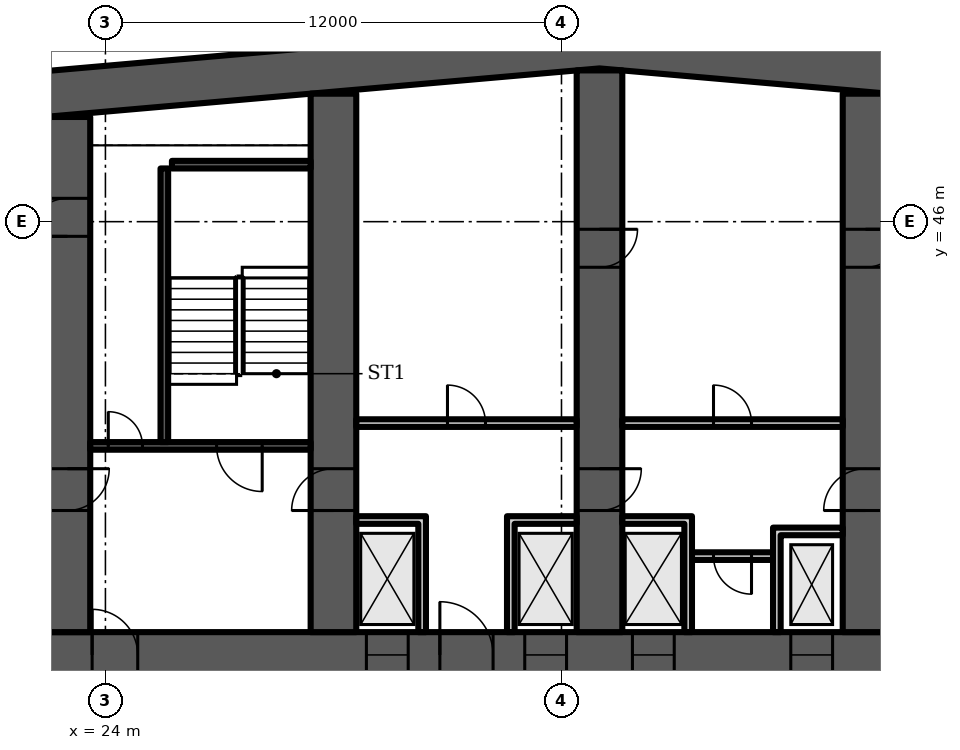
"""IFC4 building model, lengths in metres.
Left out: names, types, materials, properties, quantities, classifications, styles, units other than length and angle.
Written with IfcOpenShell. Run it as: python <this file> out.ifc"""

import sys

from ifc_helpers import new_model, si_unit, direction, frame, frame_2d, origin, place, context, subcontext, project, spatial, polyline, rectangle, outline, extrude, element, fill, save


model = new_model("IFC4")
c1 = context("Model", 3, precision=1e-05, world=origin(), true_north=direction((0.0, 1.0)))
c2 = subcontext(c1, "Body", "Model", "MODEL_VIEW")
j1 = project(units=[si_unit("LENGTHUNIT", "METRE"), si_unit("PLANEANGLEUNIT", "RADIAN")], contexts=[c1])
p1 = place(None, origin())
s1 = spatial("IfcSite", under=j1, at=p1, CompositionType="ELEMENT")
p2 = place(p1, origin())
s2 = spatial("IfcBuilding", under=s1, at=p2, CompositionType="ELEMENT")
p3 = place(p2, frame((0.0, 0.0, 77.5)))
s3 = spatial("IfcBuildingStorey", under=s2, at=p3, CompositionType="ELEMENT", Elevation=77.5)
p4 = place(p3, origin())
e1 = element("IfcWall", 1, at=p4, inside=s3, PredefinedType="SHEAR", context=c2, shape_type="SweptSolid", body=[
    extrude(outline(polyline([(9.0, 47.583), (37.0, 50.032), (65.0, 47.583), (65.0, 48.787), (37.0, 51.237), (9.0, 48.787), (9.0, 47.583)])), origin(), (0.0, 0.0, 1.0), 3.6),
])
p5 = place(p3, frame((9.0, 34.6, 0.0), z_axis=(0.0, 0.0, 1.0), x_axis=(1.0, 0.0, 0.0)))
e2 = element("IfcWall", 2, at=p5, inside=s3, PredefinedType="SHEAR", context=c2, shape_type="SweptSolid", body=[
    extrude(rectangle(XDim=56.0, YDim=1.2, at=frame_2d((28.0, 0.0))), origin(), (0.0, 0.0, 1.0), 3.6),
])
p6 = place(p5, frame((3.3, 0.0, 0.0)))
e3 = element("IfcOpeningElement", 3, at=p6, cuts=e2, PredefinedType="OPENING", context=c2, shape_type="SweptSolid", body=[
    extrude(rectangle(XDim=1.0, YDim=2.1, at=frame_2d((0.5, 1.05))), frame((0.0, 0.61, 0.0), z_axis=(0.0, -1.0, 0.0), x_axis=(1.0, 0.0, 0.0)), (0.0, 0.0, 1.0), 1.22),
])
p7 = place(p5, frame((7.867, 0.0, 0.0)))
e4 = element("IfcOpeningElement", 4, at=p7, cuts=e2, PredefinedType="OPENING", context=c2, shape_type="SweptSolid", body=[
    extrude(rectangle(XDim=1.1, YDim=2.1, at=frame_2d((0.55, 1.05))), frame((0.0, 0.61, 0.0), z_axis=(0.0, -1.0, 0.0), x_axis=(1.0, 0.0, 0.0)), (0.0, 0.0, 1.0), 1.22),
])
p8 = place(p5, frame((12.033, 0.0, 0.0)))
e5 = element("IfcOpeningElement", 5, at=p8, cuts=e2, PredefinedType="OPENING", context=c2, shape_type="SweptSolid", body=[
    extrude(rectangle(XDim=1.1, YDim=2.1, at=frame_2d((0.55, 1.05))), frame((0.0, 0.61, 0.0), z_axis=(0.0, -1.0, 0.0), x_axis=(1.0, 0.0, 0.0)), (0.0, 0.0, 1.0), 1.22),
])
p9 = place(p5, frame((9.8, 0.0, 0.0)))
e6 = element("IfcOpeningElement", 6, at=p9, cuts=e2, PredefinedType="OPENING", context=c2, shape_type="SweptSolid", body=[
    extrude(rectangle(XDim=1.4, YDim=2.1, at=frame_2d((0.7, 1.05))), frame((0.0, 0.61, 0.0), z_axis=(0.0, -1.0, 0.0), x_axis=(1.0, 0.0, 0.0)), (0.0, 0.0, 1.0), 1.22),
])
p10 = place(p5, frame((14.65, 0.0, 0.0)))
e7 = element("IfcOpeningElement", 7, at=p10, cuts=e2, PredefinedType="OPENING", context=c2, shape_type="SweptSolid", body=[
    extrude(rectangle(XDim=1.2, YDim=2.1, at=frame_2d((0.6, 1.05))), frame((0.0, 0.61, 0.0), z_axis=(0.0, -1.0, 0.0), x_axis=(1.0, 0.0, 0.0)), (0.0, 0.0, 1.0), 1.22),
])
p11 = place(p5, frame((21.867, 0.0, 0.0)))
e8 = element("IfcOpeningElement", 8, at=p11, cuts=e2, PredefinedType="OPENING", context=c2, shape_type="SweptSolid", body=[
    extrude(rectangle(XDim=1.1, YDim=2.1, at=frame_2d((0.55, 1.05))), frame((0.0, 0.61, 0.0), z_axis=(0.0, -1.0, 0.0), x_axis=(1.0, 0.0, 0.0)), (0.0, 0.0, 1.0), 1.22),
])
p12 = place(p5, frame((26.033, 0.0, 0.0)))
e9 = element("IfcOpeningElement", 9, at=p12, cuts=e2, PredefinedType="OPENING", context=c2, shape_type="SweptSolid", body=[
    extrude(rectangle(XDim=1.1, YDim=2.1, at=frame_2d((0.55, 1.05))), frame((0.0, 0.61, 0.0), z_axis=(0.0, -1.0, 0.0), x_axis=(1.0, 0.0, 0.0)), (0.0, 0.0, 1.0), 1.22),
])
p13 = place(p5, frame((23.8, 0.0, 0.0)))
e10 = element("IfcOpeningElement", 10, at=p13, cuts=e2, PredefinedType="OPENING", context=c2, shape_type="SweptSolid", body=[
    extrude(rectangle(XDim=1.4, YDim=2.1, at=frame_2d((0.7, 1.05))), frame((0.0, 0.61, 0.0), z_axis=(0.0, -1.0, 0.0), x_axis=(1.0, 0.0, 0.0)), (0.0, 0.0, 1.0), 1.22),
])
p14 = place(p5, frame((28.867, 0.0, 0.0)))
e11 = element("IfcOpeningElement", 11, at=p14, cuts=e2, PredefinedType="OPENING", context=c2, shape_type="SweptSolid", body=[
    extrude(rectangle(XDim=1.1, YDim=2.1, at=frame_2d((0.55, 1.05))), frame((0.0, 0.61, 0.0), z_axis=(0.0, -1.0, 0.0), x_axis=(1.0, 0.0, 0.0)), (0.0, 0.0, 1.0), 1.22),
])
p15 = place(p5, frame((33.033, 0.0, 0.0)))
e12 = element("IfcOpeningElement", 12, at=p15, cuts=e2, PredefinedType="OPENING", context=c2, shape_type="SweptSolid", body=[
    extrude(rectangle(XDim=1.1, YDim=2.1, at=frame_2d((0.55, 1.05))), frame((0.0, 0.61, 0.0), z_axis=(0.0, -1.0, 0.0), x_axis=(1.0, 0.0, 0.0)), (0.0, 0.0, 1.0), 1.22),
])
p16 = place(p5, frame((40.15, 0.0, 0.0)))
e13 = element("IfcOpeningElement", 13, at=p16, cuts=e2, PredefinedType="OPENING", context=c2, shape_type="SweptSolid", body=[
    extrude(rectangle(XDim=1.2, YDim=2.1, at=frame_2d((0.6, 1.05))), frame((0.0, 0.61, 0.0), z_axis=(0.0, -1.0, 0.0), x_axis=(1.0, 0.0, 0.0)), (0.0, 0.0, 1.0), 1.22),
])
p17 = place(p5, frame((44.8, 0.0, 0.0)))
e14 = element("IfcOpeningElement", 14, at=p17, cuts=e2, PredefinedType="OPENING", context=c2, shape_type="SweptSolid", body=[
    extrude(rectangle(XDim=1.4, YDim=2.1, at=frame_2d((0.7, 1.05))), frame((0.0, 0.61, 0.0), z_axis=(0.0, -1.0, 0.0), x_axis=(1.0, 0.0, 0.0)), (0.0, 0.0, 1.0), 1.22),
])
p18 = place(p5, frame((49.867, 0.0, 0.0)))
e15 = element("IfcOpeningElement", 15, at=p18, cuts=e2, PredefinedType="OPENING", context=c2, shape_type="SweptSolid", body=[
    extrude(rectangle(XDim=1.1, YDim=2.1, at=frame_2d((0.55, 1.05))), frame((0.0, 0.61, 0.0), z_axis=(0.0, -1.0, 0.0), x_axis=(1.0, 0.0, 0.0)), (0.0, 0.0, 1.0), 1.22),
])
p19 = place(p5, frame((53.5, 0.0, 0.0)))
e16 = element("IfcOpeningElement", 16, at=p19, cuts=e2, PredefinedType="OPENING", context=c2, shape_type="SweptSolid", body=[
    extrude(rectangle(XDim=1.1, YDim=2.1, at=frame_2d((0.55, 1.05))), frame((0.0, 0.61, 0.0), z_axis=(0.0, -1.0, 0.0), x_axis=(1.0, 0.0, 0.0)), (0.0, 0.0, 1.0), 1.22),
])
p20 = place(p5, frame((51.567, 0.0, 0.0)))
e17 = element("IfcOpeningElement", 17, at=p20, cuts=e2, PredefinedType="OPENING", context=c2, shape_type="SweptSolid", body=[
    extrude(rectangle(XDim=1.4, YDim=2.1, at=frame_2d((0.7, 1.05))), frame((0.0, 0.61, 0.0), z_axis=(0.0, -1.0, 0.0), x_axis=(1.0, 0.0, 0.0)), (0.0, 0.0, 1.0), 1.22),
])
p21 = place(p3, frame((23.0, 35.2, 0.0), z_axis=(0.0, 0.0, 1.0), x_axis=(0.0, 1.0, 0.0)))
e18 = element("IfcWall", 18, at=p21, inside=s3, PredefinedType="SHEAR", context=c2, shape_type="SweptSolid", body=[
    extrude(rectangle(XDim=13.555, YDim=1.2, at=frame_2d((6.778, 0.0))), origin(), (0.0, 0.0, 1.0), 3.6),
])
p22 = place(p21, frame((10.414, 0.0, 0.0)))
e19 = element("IfcOpeningElement", 19, at=p22, cuts=e18, PredefinedType="OPENING", context=c2, shape_type="SweptSolid", body=[
    extrude(rectangle(XDim=1.0, YDim=2.1, at=frame_2d((0.5, 1.05))), frame((0.0, 0.61, 0.0), z_axis=(0.0, -1.0, 0.0), x_axis=(1.0, 0.0, 0.0)), (0.0, 0.0, 1.0), 1.22),
])
p23 = place(p21, frame((3.2, 0.0, 0.0)))
e20 = element("IfcOpeningElement", 20, at=p23, cuts=e18, PredefinedType="OPENING", context=c2, shape_type="SweptSolid", body=[
    extrude(rectangle(XDim=1.1, YDim=2.1, at=frame_2d((0.55, 1.05))), frame((0.0, 0.61, 0.0), z_axis=(0.0, -1.0, 0.0), x_axis=(1.0, 0.0, 0.0)), (0.0, 0.0, 1.0), 1.22),
])
p24 = place(p3, frame((30.0, 35.2, 0.0), z_axis=(0.0, 0.0, 1.0), x_axis=(0.0, 1.0, 0.0)))
e21 = element("IfcWall", 21, at=p24, inside=s3, PredefinedType="SHEAR", context=c2, shape_type="SweptSolid", body=[
    extrude(rectangle(XDim=14.168, YDim=1.2, at=frame_2d((7.084, 0.0))), origin(), (0.0, 0.0, 1.0), 3.6),
])
p25 = place(p24, frame((3.2, 0.0, 0.0)))
e22 = element("IfcOpeningElement", 22, at=p25, cuts=e21, PredefinedType="OPENING", context=c2, shape_type="SweptSolid", body=[
    extrude(rectangle(XDim=1.1, YDim=2.1, at=frame_2d((0.55, 1.05))), frame((0.0, 0.61, 0.0), z_axis=(0.0, -1.0, 0.0), x_axis=(1.0, 0.0, 0.0)), (0.0, 0.0, 1.0), 1.22),
])
p26 = place(p3, frame((37.0, 35.2, 0.0), z_axis=(0.0, 0.0, 1.0), x_axis=(0.0, 1.0, 0.0)))
e23 = element("IfcWall", 23, at=p26, inside=s3, PredefinedType="SHEAR", context=c2, shape_type="SweptSolid", body=[
    extrude(rectangle(XDim=14.78, YDim=1.2, at=frame_2d((7.39, 0.0))), origin(), (0.0, 0.0, 1.0), 3.6),
])
p27 = place(p26, frame((3.2, 0.0, 0.0)))
e24 = element("IfcOpeningElement", 24, at=p27, cuts=e23, PredefinedType="OPENING", context=c2, shape_type="SweptSolid", body=[
    extrude(rectangle(XDim=1.1, YDim=2.1, at=frame_2d((0.55, 1.05))), frame((0.0, 0.61, 0.0), z_axis=(0.0, -1.0, 0.0), x_axis=(1.0, 0.0, 0.0)), (0.0, 0.0, 1.0), 1.22),
])
p28 = place(p26, frame((9.6, 0.0, 0.0)))
e25 = element("IfcOpeningElement", 25, at=p28, cuts=e23, PredefinedType="OPENING", context=c2, shape_type="SweptSolid", body=[
    extrude(rectangle(XDim=1.0, YDim=2.1, at=frame_2d((0.5, 1.05))), frame((0.0, 0.61, 0.0), z_axis=(0.0, -1.0, 0.0), x_axis=(1.0, 0.0, 0.0)), (0.0, 0.0, 1.0), 1.22),
])
p29 = place(p3, frame((44.0, 35.2, 0.0), z_axis=(0.0, 0.0, 1.0), x_axis=(0.0, 1.0, 0.0)))
e26 = element("IfcWall", 26, at=p29, inside=s3, PredefinedType="SHEAR", context=c2, shape_type="SweptSolid", body=[
    extrude(rectangle(XDim=14.168, YDim=1.2, at=frame_2d((7.084, 0.0))), origin(), (0.0, 0.0, 1.0), 3.6),
])
p30 = place(p29, frame((3.2, 0.0, 0.0)))
e27 = element("IfcOpeningElement", 27, at=p30, cuts=e26, PredefinedType="OPENING", context=c2, shape_type="SweptSolid", body=[
    extrude(rectangle(XDim=1.1, YDim=2.1, at=frame_2d((0.55, 1.05))), frame((0.0, 0.61, 0.0), z_axis=(0.0, -1.0, 0.0), x_axis=(1.0, 0.0, 0.0)), (0.0, 0.0, 1.0), 1.22),
])
p31 = place(p29, frame((9.6, 0.0, 0.0)))
e28 = element("IfcOpeningElement", 28, at=p31, cuts=e26, PredefinedType="OPENING", context=c2, shape_type="SweptSolid", body=[
    extrude(rectangle(XDim=1.0, YDim=2.1, at=frame_2d((0.5, 1.05))), frame((0.0, 0.61, 0.0), z_axis=(0.0, -1.0, 0.0), x_axis=(1.0, 0.0, 0.0)), (0.0, 0.0, 1.0), 1.22),
])
p32 = place(p3, frame((23.6, 40.1, 0.0), z_axis=(0.0, 0.0, 1.0), x_axis=(1.0, 0.0, 0.0)))
e29 = element("IfcWall", 29, at=p32, inside=s3, PredefinedType="SHEAR", context=c2, shape_type="SweptSolid", body=[
    extrude(rectangle(XDim=5.8, YDim=0.2, at=frame_2d((2.9, 0.0))), origin(), (0.0, 0.0, 1.0), 3.2),
])
p33 = place(p32, frame((3.325, 0.0, 0.0)))
e30 = element("IfcOpeningElement", 30, at=p33, cuts=e29, PredefinedType="OPENING", context=c2, shape_type="SweptSolid", body=[
    extrude(rectangle(XDim=1.2, YDim=2.1, at=frame_2d((0.6, 1.05))), frame((0.0, 0.11, 0.0), z_axis=(0.0, -1.0, 0.0), x_axis=(1.0, 0.0, 0.0)), (0.0, 0.0, 1.0), 0.22),
])
p34 = place(p32, frame((0.475, 0.0, 0.0)))
e31 = element("IfcOpeningElement", 31, at=p34, cuts=e29, PredefinedType="OPENING", context=c2, shape_type="SweptSolid", body=[
    extrude(rectangle(XDim=0.9, YDim=2.1, at=frame_2d((0.45, 1.05))), frame((0.0, 0.11, 0.0), z_axis=(0.0, -1.0, 0.0), x_axis=(1.0, 0.0, 0.0)), (0.0, 0.0, 1.0), 0.22),
])
p35 = place(p3, frame((25.55, 40.2, 0.0), z_axis=(0.0, 0.0, 1.0), x_axis=(0.0, 1.0, 0.0)))
e32 = element("IfcWall", 32, at=p35, inside=s3, PredefinedType="SHEAR", context=c2, shape_type="SweptSolid", body=[
    extrude(rectangle(XDim=7.2, YDim=0.2, at=frame_2d((3.6, 0.0))), origin(), (0.0, 0.0, 1.0), 3.2),
])
p36 = place(p3, frame((25.75, 47.5, 0.0), z_axis=(0.0, 0.0, 1.0), x_axis=(1.0, 0.0, 0.0)))
e33 = element("IfcWall", 33, at=p36, inside=s3, PredefinedType="SHEAR", context=c2, shape_type="SweptSolid", body=[
    extrude(rectangle(XDim=3.65, YDim=0.2, at=frame_2d((1.825, 0.0))), origin(), (0.0, 0.0, 1.0), 3.2),
])
p37 = place(p3, frame((30.6, 40.7, 0.0), z_axis=(0.0, 0.0, 1.0), x_axis=(1.0, 0.0, 0.0)))
e34 = element("IfcWall", 34, at=p37, inside=s3, PredefinedType="PARTITIONING", context=c2, shape_type="SweptSolid", body=[
    extrude(rectangle(XDim=5.8, YDim=0.2, at=frame_2d((2.9, 0.0))), origin(), (0.0, 0.0, 1.0), 3.2),
])
p38 = place(p37, frame((2.4, 0.0, 0.0)))
e35 = element("IfcOpeningElement", 35, at=p38, cuts=e34, PredefinedType="OPENING", context=c2, shape_type="SweptSolid", body=[
    extrude(rectangle(XDim=1.0, YDim=2.1, at=frame_2d((0.5, 1.05))), frame((0.0, 0.11, 0.0), z_axis=(0.0, -1.0, 0.0), x_axis=(1.0, 0.0, 0.0)), (0.0, 0.0, 1.0), 0.22),
])
p39 = place(p3, frame((0.0, 0.0, -0.0)))
e36 = element("IfcWall", 36, at=p39, inside=s3, PredefinedType="PARTITIONING", context=c2, shape_type="SweptSolid", body=[
    extrude(outline(polyline([(32.233, 38.05), (30.6, 38.05), (30.6, 38.25), (32.233, 38.25), (32.433, 38.25), (32.433, 35.2), (32.233, 35.2), (32.233, 38.05)])), origin(), (0.0, 0.0, 1.0), 3.2),
])
p40 = place(p3, frame((0.0, 0.0, -0.0)))
e37 = element("IfcWall", 37, at=p40, inside=s3, PredefinedType="PARTITIONING", context=c2, shape_type="SweptSolid", body=[
    extrude(outline(polyline([(34.567, 38.25), (34.767, 38.25), (36.4, 38.25), (36.4, 38.05), (34.767, 38.05), (34.767, 35.2), (34.567, 35.2), (34.567, 38.25)])), origin(), (0.0, 0.0, 1.0), 3.2),
])
p41 = place(p3, frame((39.433, 37.2, 0.0), z_axis=(0.0, 0.0, 1.0), x_axis=(1.0, 0.0, 0.0)))
e38 = element("IfcWall", 38, at=p41, inside=s3, PredefinedType="PARTITIONING", context=c2, shape_type="SweptSolid", body=[
    extrude(rectangle(XDim=2.133, YDim=0.2, at=frame_2d((1.067, 0.0))), origin(), (0.0, 0.0, 1.0), 3.2),
])
p42 = place(p41, frame((0.567, 0.0, 0.0)))
e39 = element("IfcOpeningElement", 39, at=p42, cuts=e38, PredefinedType="OPENING", context=c2, shape_type="SweptSolid", body=[
    extrude(rectangle(XDim=1.0, YDim=2.1, at=frame_2d((0.5, 1.05))), frame((0.0, 0.11, 0.0), z_axis=(0.0, -1.0, 0.0), x_axis=(1.0, 0.0, 0.0)), (0.0, 0.0, 1.0), 0.22),
])
p43 = place(p3, frame((37.6, 40.7, 0.0), z_axis=(0.0, 0.0, 1.0), x_axis=(1.0, 0.0, 0.0)))
e40 = element("IfcWall", 40, at=p43, inside=s3, PredefinedType="PARTITIONING", context=c2, shape_type="SweptSolid", body=[
    extrude(rectangle(XDim=5.8, YDim=0.2, at=frame_2d((2.9, 0.0))), origin(), (0.0, 0.0, 1.0), 3.2),
])
p44 = place(p43, frame((2.4, 0.0, 0.0)))
e41 = element("IfcOpeningElement", 41, at=p44, cuts=e40, PredefinedType="OPENING", context=c2, shape_type="SweptSolid", body=[
    extrude(rectangle(XDim=1.0, YDim=2.1, at=frame_2d((0.5, 1.05))), frame((0.0, 0.11, 0.0), z_axis=(0.0, -1.0, 0.0), x_axis=(1.0, 0.0, 0.0)), (0.0, 0.0, 1.0), 0.22),
])
p45 = place(p3, frame((0.0, 0.0, -0.0)))
e42 = element("IfcWall", 42, at=p45, inside=s3, PredefinedType="PARTITIONING", context=c2, shape_type="SweptSolid", body=[
    extrude(outline(polyline([(41.567, 37.95), (41.767, 37.95), (43.4, 37.95), (43.4, 37.75), (41.767, 37.75), (41.767, 35.2), (41.567, 35.2), (41.567, 37.95)])), origin(), (0.0, 0.0, 1.0), 3.2),
])
p46 = place(p3, frame((0.0, 0.0, -0.0)))
e43 = element("IfcWall", 43, at=p46, inside=s3, PredefinedType="PARTITIONING", context=c2, shape_type="SweptSolid", body=[
    extrude(outline(polyline([(39.233, 38.05), (37.6, 38.05), (37.6, 38.25), (39.233, 38.25), (39.433, 38.25), (39.433, 35.2), (39.233, 35.2), (39.233, 38.05)])), origin(), (0.0, 0.0, 1.0), 3.2),
])
p47 = place(p22, origin())
e44 = element("IfcDoor", 44, at=p47, inside=s3, OperationType="SINGLE_SWING_LEFT", PredefinedType="DOOR", context=c2, shape_type="SweptSolid", body=[
    extrude(rectangle(XDim=1.0, YDim=2.1, at=frame_2d((0.5, 1.05))), frame((0.0, 0.6, 0.0), z_axis=(0.0, -1.0, 0.0), x_axis=(1.0, 0.0, 0.0)), (0.0, 0.0, 1.0), 1.199),
])
fill(e19, e44)
p48 = place(p33, origin())
e45 = element("IfcDoor", 45, at=p48, inside=s3, OperationType="SINGLE_SWING_RIGHT", PredefinedType="DOOR", context=c2, shape_type="SweptSolid", body=[
    extrude(rectangle(XDim=1.2, YDim=2.1, at=frame_2d((0.6, 1.05))), frame((0.0, 0.025, 0.0), z_axis=(0.0, -1.0, 0.0), x_axis=(1.0, 0.0, 0.0)), (0.0, 0.0, 1.0), 0.05),
])
fill(e30, e45)
p49 = place(p34, origin())
e46 = element("IfcDoor", 46, at=p49, inside=s3, OperationType="SINGLE_SWING_LEFT", PredefinedType="DOOR", context=c2, shape_type="SweptSolid", body=[
    extrude(rectangle(XDim=0.9, YDim=2.1, at=frame_2d((0.45, 1.05))), frame((0.0, 0.025, 0.0), z_axis=(0.0, -1.0, 0.0), x_axis=(1.0, 0.0, 0.0)), (0.0, 0.0, 1.0), 0.05),
])
fill(e31, e46)
p50 = place(p10, origin())
e47 = element("IfcDoor", 47, at=p50, inside=s3, OperationType="SINGLE_SWING_LEFT", PredefinedType="DOOR", context=c2, shape_type="SweptSolid", body=[
    extrude(rectangle(XDim=1.2, YDim=2.1, at=frame_2d((0.6, 1.05))), frame((0.0, 0.025, 0.0), z_axis=(0.0, -1.0, 0.0), x_axis=(1.0, 0.0, 0.0)), (0.0, 0.0, 1.0), 0.05),
])
fill(e7, e47)
p51 = place(p11, origin())
e48 = element("IfcDoor", 48, at=p51, inside=s3, OperationType="DOUBLE_DOOR_SLIDING", PredefinedType="DOOR", context=c2, shape_type="SweptSolid", body=[
    extrude(rectangle(XDim=1.1, YDim=2.1, at=frame_2d((0.55, 1.05))), frame((0.0, 0.025, 0.0), z_axis=(0.0, -1.0, 0.0), x_axis=(1.0, 0.0, 0.0)), (0.0, 0.0, 1.0), 0.05),
])
fill(e8, e48)
p52 = place(p12, origin())
e49 = element("IfcDoor", 49, at=p52, inside=s3, OperationType="DOUBLE_DOOR_SLIDING", PredefinedType="DOOR", context=c2, shape_type="SweptSolid", body=[
    extrude(rectangle(XDim=1.1, YDim=2.1, at=frame_2d((0.55, 1.05))), frame((0.0, 0.025, 0.0), z_axis=(0.0, -1.0, 0.0), x_axis=(1.0, 0.0, 0.0)), (0.0, 0.0, 1.0), 0.05),
])
fill(e9, e49)
p53 = place(p13, origin())
e50 = element("IfcDoor", 50, at=p53, inside=s3, OperationType="DOUBLE_DOOR_SINGLE_SWING", PredefinedType="DOOR", context=c2, shape_type="SweptSolid", body=[
    extrude(rectangle(XDim=1.4, YDim=2.1, at=frame_2d((0.7, 1.05))), frame((0.0, 0.025, 0.0), z_axis=(0.0, -1.0, 0.0), x_axis=(1.0, 0.0, 0.0)), (0.0, 0.0, 1.0), 0.05),
])
fill(e10, e50)
p54 = place(p38, origin())
e51 = element("IfcDoor", 51, at=p54, inside=s3, OperationType="SINGLE_SWING_LEFT", PredefinedType="DOOR", context=c2, shape_type="SweptSolid", body=[
    extrude(rectangle(XDim=1.0, YDim=2.1, at=frame_2d((0.5, 1.05))), frame((0.0, 0.025, 0.0), z_axis=(0.0, -1.0, 0.0), x_axis=(1.0, 0.0, 0.0)), (0.0, 0.0, 1.0), 0.05),
])
fill(e35, e51)
p55 = place(p42, origin())
e52 = element("IfcDoor", 52, at=p55, inside=s3, OperationType="SINGLE_SWING_RIGHT", PredefinedType="DOOR", context=c2, shape_type="SweptSolid", body=[
    extrude(rectangle(XDim=1.0, YDim=2.1, at=frame_2d((0.5, 1.05))), frame((0.0, 0.025, 0.0), z_axis=(0.0, -1.0, 0.0), x_axis=(1.0, 0.0, 0.0)), (0.0, 0.0, 1.0), 0.05),
])
fill(e39, e52)
p56 = place(p14, origin())
e53 = element("IfcDoor", 53, at=p56, inside=s3, OperationType="DOUBLE_DOOR_SLIDING", PredefinedType="DOOR", context=c2, shape_type="SweptSolid", body=[
    extrude(rectangle(XDim=1.1, YDim=2.1, at=frame_2d((0.55, 1.05))), frame((0.0, 0.025, 0.0), z_axis=(0.0, -1.0, 0.0), x_axis=(1.0, 0.0, 0.0)), (0.0, 0.0, 1.0), 0.05),
])
fill(e11, e53)
p57 = place(p15, origin())
e54 = element("IfcDoor", 54, at=p57, inside=s3, OperationType="DOUBLE_DOOR_SLIDING", PredefinedType="DOOR", context=c2, shape_type="SweptSolid", body=[
    extrude(rectangle(XDim=1.1, YDim=2.1, at=frame_2d((0.55, 1.05))), frame((0.0, 0.025, 0.0), z_axis=(0.0, -1.0, 0.0), x_axis=(1.0, 0.0, 0.0)), (0.0, 0.0, 1.0), 0.05),
])
fill(e12, e54)
p58 = place(p44, origin())
e55 = element("IfcDoor", 55, at=p58, inside=s3, OperationType="SINGLE_SWING_LEFT", PredefinedType="DOOR", context=c2, shape_type="SweptSolid", body=[
    extrude(rectangle(XDim=1.0, YDim=2.1, at=frame_2d((0.5, 1.05))), frame((0.0, 0.025, 0.0), z_axis=(0.0, -1.0, 0.0), x_axis=(1.0, 0.0, 0.0)), (0.0, 0.0, 1.0), 0.05),
])
fill(e41, e55)
p59 = place(p23, origin())
e56 = element("IfcDoor", 56, at=p59, inside=s3, OperationType="SINGLE_SWING_RIGHT", PredefinedType="DOOR", context=c2, shape_type="SweptSolid", body=[
    extrude(rectangle(XDim=1.1, YDim=2.1, at=frame_2d((0.55, 1.05))), frame((0.0, 0.025, 0.0), z_axis=(0.0, -1.0, 0.0), x_axis=(1.0, 0.0, 0.0)), (0.0, 0.0, 1.0), 0.05),
])
fill(e20, e56)
p60 = place(p25, origin())
e57 = element("IfcDoor", 57, at=p60, inside=s3, OperationType="SINGLE_SWING_LEFT", PredefinedType="DOOR", context=c2, shape_type="SweptSolid", body=[
    extrude(rectangle(XDim=1.1, YDim=2.1, at=frame_2d((0.55, 1.05))), frame((0.0, 0.025, 0.0), z_axis=(0.0, -1.0, 0.0), x_axis=(1.0, 0.0, 0.0)), (0.0, 0.0, 1.0), 0.05),
])
fill(e22, e57)
p61 = place(p27, origin())
e58 = element("IfcDoor", 58, at=p61, inside=s3, OperationType="SINGLE_SWING_RIGHT", PredefinedType="DOOR", context=c2, shape_type="SweptSolid", body=[
    extrude(rectangle(XDim=1.1, YDim=2.1, at=frame_2d((0.55, 1.05))), frame((0.0, 0.025, 0.0), z_axis=(0.0, -1.0, 0.0), x_axis=(1.0, 0.0, 0.0)), (0.0, 0.0, 1.0), 0.05),
])
fill(e24, e58)
p62 = place(p28, origin())
e59 = element("IfcDoor", 59, at=p62, inside=s3, OperationType="SINGLE_SWING_RIGHT", PredefinedType="DOOR", context=c2, shape_type="SweptSolid", body=[
    extrude(rectangle(XDim=1.0, YDim=2.1, at=frame_2d((0.5, 1.05))), frame((0.0, 0.6, 0.0), z_axis=(0.0, -1.0, 0.0), x_axis=(1.0, 0.0, 0.0)), (0.0, 0.0, 1.0), 1.199),
])
fill(e25, e59)
p63 = place(p30, origin())
e60 = element("IfcDoor", 60, at=p63, inside=s3, OperationType="SINGLE_SWING_LEFT", PredefinedType="DOOR", context=c2, shape_type="SweptSolid", body=[
    extrude(rectangle(XDim=1.1, YDim=2.1, at=frame_2d((0.55, 1.05))), frame((0.0, 0.025, 0.0), z_axis=(0.0, -1.0, 0.0), x_axis=(1.0, 0.0, 0.0)), (0.0, 0.0, 1.0), 0.05),
])
fill(e27, e60)
p64 = place(p31, origin())
e61 = element("IfcDoor", 61, at=p64, inside=s3, OperationType="SINGLE_SWING_RIGHT", PredefinedType="DOOR", context=c2, shape_type="SweptSolid", body=[
    extrude(rectangle(XDim=1.0, YDim=2.1, at=frame_2d((0.5, 1.05))), frame((0.0, 0.6, 0.0), z_axis=(0.0, -1.0, 0.0), x_axis=(1.0, 0.0, 0.0)), (0.0, 0.0, 1.0), 1.199),
])
fill(e28, e61)
save(model, sys.argv[1])
